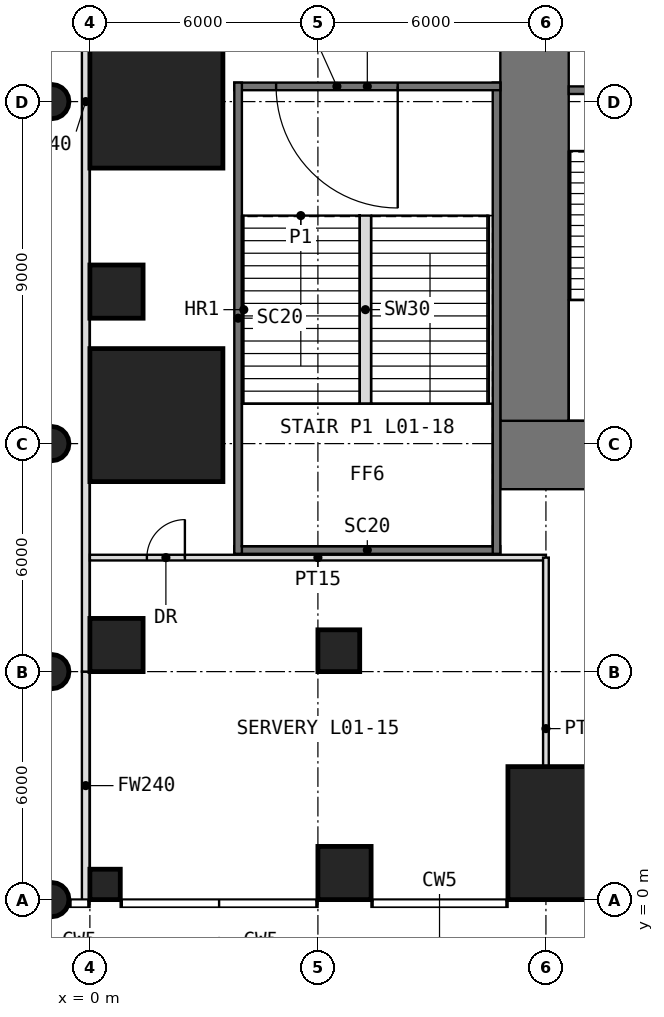
"""IFC4 building model, lengths in metres.
Left out: names, types, materials, properties, quantities, classifications, styles, units other than length and angle.
Written with IfcOpenShell. Run it as: python <this file> out.ifc"""

import sys

from ifc_helpers import new_model, si_unit, direction, frame, frame_2d, origin, origin_2d, place, context, subcontext, project, spatial, rectangle, circle, extrude, element, fill, save


model = new_model("IFC4")
c1 = context("Model", 3, precision=1e-05, world=origin(), true_north=direction((0.0, 1.0)))
c2 = subcontext(c1, "Body", "Model", "MODEL_VIEW")
j1 = project(units=[si_unit("LENGTHUNIT", "METRE"), si_unit("PLANEANGLEUNIT", "RADIAN")], contexts=[c1])
p1 = place(None, origin())
s1 = spatial("IfcSite", under=j1, at=p1, CompositionType="ELEMENT")
p2 = place(p1, origin())
s2 = spatial("IfcBuilding", under=s1, at=p2, CompositionType="ELEMENT")
p3 = place(p2, frame((0.0, 0.0, 6.0)))
s3 = spatial("IfcBuildingStorey", under=s2, at=p3, CompositionType="ELEMENT", Elevation=6.0)
p4 = place(p3, frame((-1.0, 0.0, 0.0), z_axis=(0.0, 0.0, 1.0), x_axis=(1.0, 0.0, 0.0)))
e1 = element("IfcColumn", 1, at=p4, inside=s3, PredefinedType="COLUMN", context=c2, shape_type="SweptSolid", body=[
    extrude(circle(Radius=0.45, at=origin_2d()), origin(), (0.0, 0.0, 1.0), 5.0),
])
p5 = place(p3, frame((0.4, 0.4, 0.0), z_axis=(0.0, 0.0, 1.0), x_axis=(1.0, 0.0, 0.0)))
e2 = element("IfcColumn", 2, at=p5, inside=s3, PredefinedType="COLUMN", context=c2, shape_type="SweptSolid", body=[
    extrude(rectangle(XDim=0.8, YDim=0.8, at=origin_2d()), origin(), (0.0, 0.0, 1.0), 5.0),
])
p6 = place(p3, frame((6.7, 0.7, 0.0), z_axis=(0.0, 0.0, 1.0), x_axis=(1.0, 0.0, 0.0)))
e3 = element("IfcColumn", 3, at=p6, inside=s3, PredefinedType="COLUMN", context=c2, shape_type="SweptSolid", body=[
    extrude(rectangle(XDim=1.4, YDim=1.4, at=origin_2d()), origin(), (0.0, 0.0, 1.0), 5.0),
])
p7 = place(p3, frame((12.75, 1.75, 0.0), z_axis=(0.0, 0.0, 1.0), x_axis=(1.0, 0.0, 0.0)))
e4 = element("IfcColumn", 4, at=p7, inside=s3, PredefinedType="COLUMN", context=c2, shape_type="SweptSolid", body=[
    extrude(rectangle(XDim=3.5, YDim=3.5, at=origin_2d()), origin(), (0.0, 0.0, 1.0), 5.0),
])
p8 = place(p3, frame((-1.0, 6.0, 0.0), z_axis=(0.0, 0.0, 1.0), x_axis=(1.0, 0.0, 0.0)))
e5 = element("IfcColumn", 5, at=p8, inside=s3, PredefinedType="COLUMN", context=c2, shape_type="SweptSolid", body=[
    extrude(circle(Radius=0.45, at=origin_2d()), origin(), (0.0, 0.0, 1.0), 5.0),
])
p9 = place(p3, frame((0.7, 6.7, 0.0), z_axis=(0.0, 0.0, 1.0), x_axis=(1.0, 0.0, 0.0)))
e6 = element("IfcColumn", 6, at=p9, inside=s3, PredefinedType="COLUMN", context=c2, shape_type="SweptSolid", body=[
    extrude(rectangle(XDim=1.4, YDim=1.4, at=origin_2d()), origin(), (0.0, 0.0, 1.0), 5.0),
])
p10 = place(p3, frame((6.55, 6.55, 0.0), z_axis=(0.0, 0.0, 1.0), x_axis=(1.0, 0.0, 0.0)))
e7 = element("IfcColumn", 7, at=p10, inside=s3, PredefinedType="COLUMN", context=c2, shape_type="SweptSolid", body=[
    extrude(rectangle(XDim=1.1, YDim=1.1, at=origin_2d()), origin(), (0.0, 0.0, 1.0), 5.0),
])
p11 = place(p3, frame((1.75, 12.75, 0.0), z_axis=(0.0, 0.0, 1.0), x_axis=(1.0, 0.0, 0.0)))
e8 = element("IfcColumn", 8, at=p11, inside=s3, PredefinedType="COLUMN", context=c2, shape_type="SweptSolid", body=[
    extrude(rectangle(XDim=3.5, YDim=3.5, at=origin_2d()), origin(), (0.0, 0.0, 1.0), 5.0),
])
p12 = place(p3, frame((-1.0, 12.0, 0.0), z_axis=(0.0, 0.0, 1.0), x_axis=(1.0, 0.0, 0.0)))
e9 = element("IfcColumn", 9, at=p12, inside=s3, PredefinedType="COLUMN", context=c2, shape_type="SweptSolid", body=[
    extrude(circle(Radius=0.45, at=origin_2d()), origin(), (0.0, 0.0, 1.0), 5.0),
])
p13 = place(p3, frame((0.7, 16.0, 0.0), z_axis=(0.0, 0.0, 1.0), x_axis=(1.0, 0.0, 0.0)))
e10 = element("IfcColumn", 10, at=p13, inside=s3, PredefinedType="COLUMN", context=c2, shape_type="SweptSolid", body=[
    extrude(rectangle(XDim=1.4, YDim=1.4, at=origin_2d()), origin(), (0.0, 0.0, 1.0), 5.0),
])
p14 = place(p3, frame((-1.0, 21.0, 0.0), z_axis=(0.0, 0.0, 1.0), x_axis=(1.0, 0.0, 0.0)))
e11 = element("IfcColumn", 11, at=p14, inside=s3, PredefinedType="COLUMN", context=c2, shape_type="SweptSolid", body=[
    extrude(circle(Radius=0.45, at=origin_2d()), origin(), (0.0, 0.0, 1.0), 5.0),
])
p15 = place(p3, frame((1.75, 21.0, 0.0), z_axis=(0.0, 0.0, 1.0), x_axis=(1.0, 0.0, 0.0)))
e12 = element("IfcColumn", 12, at=p15, inside=s3, PredefinedType="COLUMN", context=c2, shape_type="SweptSolid", body=[
    extrude(rectangle(XDim=3.5, YDim=3.5, at=origin_2d()), origin(), (0.0, 0.0, 1.0), 5.0),
])
p16 = place(p3, frame((10.8, 11.7, -0.2), z_axis=(0.0, 0.0, 1.0), x_axis=(1.0, 0.0, 0.0)))
e13 = element("IfcWall", 13, at=p16, inside=s3, PredefinedType="SHEAR", context=c2, shape_type="SweptSolid", body=[
    extrude(rectangle(XDim=20.4, YDim=1.8, at=frame_2d((10.2, 0.0))), origin(), (0.0, 0.0, 1.0), 4.9),
])
p17 = place(p16, frame((9.2, 0.0, 0.2)))
e14 = element("IfcOpeningElement", 14, at=p17, cuts=e13, PredefinedType="OPENING", context=c2, shape_type="SweptSolid", body=[
    extrude(rectangle(XDim=2.0, YDim=2.2, at=frame_2d((1.0, 1.1))), frame((0.0, 0.91, 0.0), z_axis=(0.0, -1.0, 0.0), x_axis=(1.0, 0.0, 0.0)), (0.0, 0.0, 1.0), 1.82),
])
p18 = place(p3, frame((11.7, 12.6, -0.2), z_axis=(0.0, 0.0, 1.0), x_axis=(0.0, 1.0, 0.0)))
e15 = element("IfcWall", 15, at=p18, inside=s3, PredefinedType="SHEAR", context=c2, shape_type="SweptSolid", body=[
    extrude(rectangle(XDim=16.8, YDim=1.8, at=frame_2d((8.4, 0.0))), origin(), (0.0, 0.0, 1.0), 4.9),
])
p19 = place(p18, frame((9.9, 0.0, 0.2)))
e16 = element("IfcOpeningElement", 16, at=p19, cuts=e15, PredefinedType="OPENING", context=c2, shape_type="SweptSolid", body=[
    extrude(rectangle(XDim=1.0, YDim=2.2, at=frame_2d((0.5, 1.1))), frame((0.0, 0.91, 0.0), z_axis=(0.0, -1.0, 0.0), x_axis=(1.0, 0.0, 0.0)), (0.0, 0.0, 1.0), 1.82),
])
p20 = place(p3, frame((12.6, 21.3, -0.2), z_axis=(0.0, 0.0, 1.0), x_axis=(1.0, 0.0, 0.0)))
e17 = element("IfcWall", 17, at=p20, inside=s3, PredefinedType="SHEAR", context=c2, shape_type="SweptSolid", body=[
    extrude(rectangle(XDim=3.2, YDim=0.2, at=frame_2d((1.6, 0.0))), origin(), (0.0, 0.0, 1.0), 4.9),
])
p21 = place(p20, frame((1.1, 0.0, 0.2)))
e18 = element("IfcOpeningElement", 18, at=p21, cuts=e17, PredefinedType="OPENING", context=c2, shape_type="SweptSolid", body=[
    extrude(rectangle(XDim=1.0, YDim=2.2, at=frame_2d((0.5, 1.1))), frame((0.0, 0.11, 0.0), z_axis=(0.0, -1.0, 0.0), x_axis=(1.0, 0.0, 0.0)), (0.0, 0.0, 1.0), 0.22),
])
p22 = place(p3, frame((3.8, 9.2, -0.2), z_axis=(0.0, 0.0, 1.0), x_axis=(1.0, 0.0, 0.0)))
e19 = element("IfcWall", 19, at=p22, inside=s3, PredefinedType="SOLIDWALL", context=c2, shape_type="SweptSolid", body=[
    extrude(rectangle(XDim=7.0, YDim=0.2, at=frame_2d((3.5, 0.0))), origin(), (0.0, 0.0, 1.0), 4.9),
])
p23 = place(p3, frame((10.7, 9.1, -0.2), z_axis=(0.0, 0.0, 1.0), x_axis=(0.0, 1.0, 0.0)))
e20 = element("IfcWall", 20, at=p23, inside=s3, PredefinedType="SOLIDWALL", context=c2, shape_type="SweptSolid", body=[
    extrude(rectangle(XDim=12.4, YDim=0.2, at=frame_2d((6.2, 0.0))), origin(), (0.0, 0.0, 1.0), 4.9),
])
p24 = place(p3, frame((10.8, 21.4, -0.2), z_axis=(0.0, 0.0, 1.0), x_axis=(-1.0, 0.0, 0.0)))
e21 = element("IfcWall", 21, at=p24, inside=s3, PredefinedType="SOLIDWALL", context=c2, shape_type="SweptSolid", body=[
    extrude(rectangle(XDim=7.0, YDim=0.2, at=frame_2d((3.5, 0.0))), origin(), (0.0, 0.0, 1.0), 4.9),
])
p25 = place(p24, frame((2.7, 0.0, 0.2)))
e22 = element("IfcOpeningElement", 22, at=p25, cuts=e21, PredefinedType="OPENING", context=c2, shape_type="SweptSolid", body=[
    extrude(rectangle(XDim=3.2, YDim=2.4, at=frame_2d((1.6, 1.2))), frame((0.0, 0.11, 0.0), z_axis=(0.0, -1.0, 0.0), x_axis=(1.0, 0.0, 0.0)), (0.0, 0.0, 1.0), 0.22),
])
p26 = place(p3, frame((3.9, 21.5, -0.2), z_axis=(0.0, 0.0, 1.0), x_axis=(0.0, -1.0, 0.0)))
e23 = element("IfcWall", 23, at=p26, inside=s3, PredefinedType="SOLIDWALL", context=c2, shape_type="SweptSolid", body=[
    extrude(rectangle(XDim=12.4, YDim=0.2, at=frame_2d((6.2, 0.0))), origin(), (0.0, 0.0, 1.0), 4.9),
])
p27 = place(p3, frame((-0.11, 0.0, 0.0), z_axis=(0.0, 0.0, 1.0), x_axis=(0.0, 1.0, 0.0)))
e24 = element("IfcWall", 24, at=p27, inside=s3, PredefinedType="PARTITIONING", context=c2, shape_type="SweptSolid", body=[
    extrude(rectangle(XDim=6.0, YDim=0.2, at=frame_2d((3.0, 0.0))), origin(), (0.0, 0.0, 1.0), 3.88),
])
p28 = place(p3, frame((-0.11, 6.0, 0.0), z_axis=(0.0, 0.0, 1.0), x_axis=(0.0, 1.0, 0.0)))
e25 = element("IfcWall", 25, at=p28, inside=s3, PredefinedType="PARTITIONING", context=c2, shape_type="SweptSolid", body=[
    extrude(rectangle(XDim=30.0, YDim=0.2, at=frame_2d((15.0, 0.0))), origin(), (0.0, 0.0, 1.0), 4.5),
])
p29 = place(p28, frame((17.1, 0.0, 0.0)))
e26 = element("IfcOpeningElement", 26, at=p29, cuts=e25, PredefinedType="OPENING", context=c2, shape_type="SweptSolid", body=[
    extrude(rectangle(XDim=1.8, YDim=2.4, at=frame_2d((0.9, 1.2))), frame((0.0, 0.11, 0.0), z_axis=(0.0, -1.0, 0.0), x_axis=(1.0, 0.0, 0.0)), (0.0, 0.0, 1.0), 0.22),
])
p30 = place(p3, frame((0.0, 9.0, 0.0), z_axis=(0.0, 0.0, 1.0), x_axis=(1.0, 0.0, 0.0)))
e27 = element("IfcWall", 27, at=p30, inside=s3, PredefinedType="PARTITIONING", context=c2, shape_type="SweptSolid", body=[
    extrude(rectangle(XDim=12.0, YDim=0.15, at=frame_2d((6.0, 0.0))), origin(), (0.0, 0.0, 1.0), 4.5),
])
p31 = place(p30, frame((1.5, 0.0, 0.0)))
e28 = element("IfcOpeningElement", 28, at=p31, cuts=e27, PredefinedType="OPENING", context=c2, shape_type="SweptSolid", body=[
    extrude(rectangle(XDim=1.0, YDim=2.2, at=frame_2d((0.5, 1.1))), frame((0.0, 0.085, 0.0), z_axis=(0.0, -1.0, 0.0), x_axis=(1.0, 0.0, 0.0)), (0.0, 0.0, 1.0), 0.17),
])
p32 = place(p3, frame((12.0, 0.0, 0.0), z_axis=(0.0, 0.0, 1.0), x_axis=(0.0, 1.0, 0.0)))
e29 = element("IfcWall", 29, at=p32, inside=s3, PredefinedType="PARTITIONING", context=c2, shape_type="SweptSolid", body=[
    extrude(rectangle(XDim=9.0, YDim=0.15, at=frame_2d((4.5, 0.0))), origin(), (0.0, 0.0, 1.0), 4.5),
])
p33 = place(p3, frame((7.25, 13.05, 0.0), z_axis=(0.0, 0.0, 1.0), x_axis=(0.0, 1.0, 0.0)))
e30 = element("IfcWall", 30, at=p33, inside=s3, PredefinedType="PARTITIONING", context=c2, shape_type="SweptSolid", body=[
    extrude(rectangle(XDim=4.95, YDim=0.3, at=frame_2d((2.475, 0.0))), origin(), (0.0, 0.0, 1.0), 5.0),
])
p34 = place(p25, origin())
e31 = element("IfcDoor", 31, at=p34, inside=s3, OperationType="DOUBLE_DOOR_SINGLE_SWING", PredefinedType="DOOR", context=c2, shape_type="SweptSolid", body=[
    extrude(rectangle(XDim=3.2, YDim=2.4, at=frame_2d((1.6, 1.2))), frame((0.0, 0.025, 0.0), z_axis=(0.0, -1.0, 0.0), x_axis=(1.0, 0.0, 0.0)), (0.0, 0.0, 1.0), 0.05),
])
fill(e22, e31)
p35 = place(p31, origin())
e32 = element("IfcDoor", 32, at=p35, inside=s3, OperationType="SINGLE_SWING_RIGHT", PredefinedType="DOOR", context=c2, shape_type="SweptSolid", body=[
    extrude(rectangle(XDim=1.0, YDim=2.2, at=frame_2d((0.5, 1.1))), frame((0.0, 0.025, 0.0), z_axis=(0.0, -1.0, 0.0), x_axis=(1.0, 0.0, 0.0)), (0.0, 0.0, 1.0), 0.05),
])
fill(e28, e32)
save(model, sys.argv[1])
